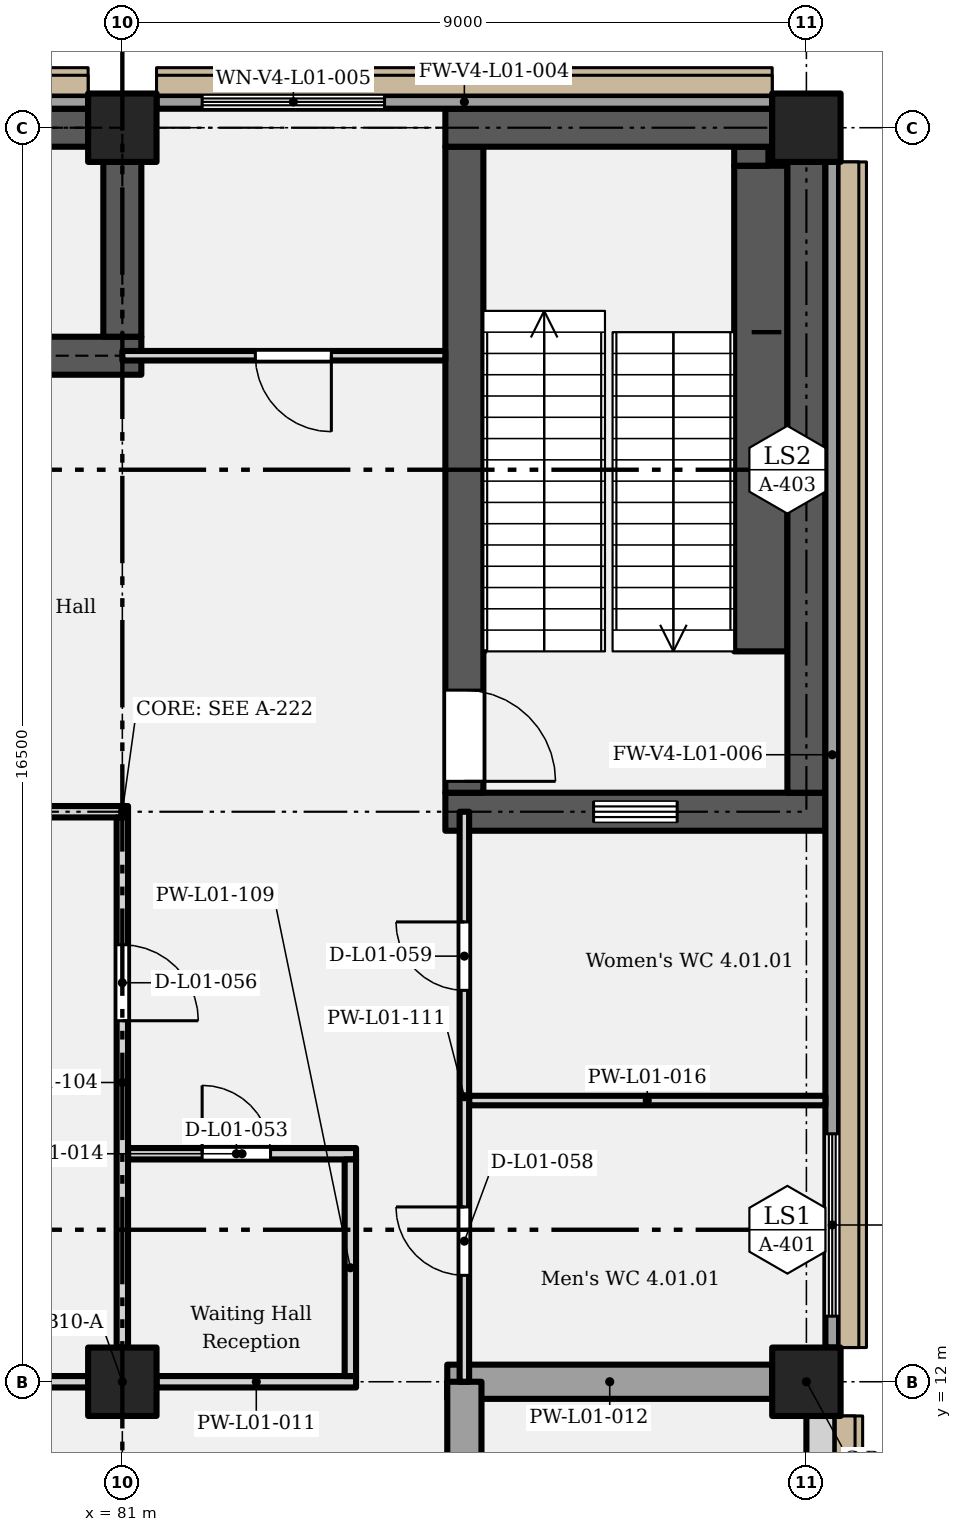
"""IFC4 building model, lengths in metres.
Left out: names, types, materials, properties, quantities, classifications, styles, units other than length and angle.
Written with IfcOpenShell. Run it as: python <this file> out.ifc"""

import sys

from ifc_helpers import new_model, si_unit, direction, frame, frame_2d, origin, origin_2d, place, context, subcontext, project, spatial, rectangle, extrude, element, fill, save


model = new_model("IFC4")
c1 = context("Model", 3, precision=1e-05, world=origin(), true_north=direction((0.0, 1.0)))
c2 = subcontext(c1, "Body", "Model", "MODEL_VIEW")
j1 = project(units=[si_unit("LENGTHUNIT", "METRE"), si_unit("PLANEANGLEUNIT", "RADIAN")], contexts=[c1])
p1 = place(None, origin())
s1 = spatial("IfcSite", under=j1, at=p1, CompositionType="ELEMENT")
p2 = place(p1, origin())
s2 = spatial("IfcBuilding", under=s1, at=p2, CompositionType="ELEMENT")
p3 = place(p2, frame((0.0, 0.0, 6.6)))
s3 = spatial("IfcBuildingStorey", under=s2, at=p3, CompositionType="ELEMENT", Elevation=6.6)
for number, where, z_axis, x_axis in (
    (1, (81.0, 12.0, 0.0), (0.0, 0.0, 1.0), (1.0, 0.0, 0.0)),
    (2, (90.0, 12.0, 0.0), (0.0, 0.0, 1.0), (1.0, 0.0, 0.0)),
    (3, (81.0, 28.5, 0.0), (0.0, 0.0, 1.0), (1.0, 0.0, 0.0)),
    (4, (90.0, 28.5, 0.0), (0.0, 0.0, 1.0), (1.0, 0.0, 0.0)),
):
    element("IfcColumn", number, at=place(p3, frame(where, z_axis=z_axis, x_axis=x_axis)), inside=s3, PredefinedType="COLUMN", context=c2, shape_type="SweptSolid", body=[
        extrude(rectangle(XDim=0.9, YDim=0.9, at=origin_2d()), origin(), (0.0, 0.0, 1.0), 5.202),
    ])
p4 = place(p3, frame((85.25, 19.5, 0.0), z_axis=(0.0, 0.0, 1.0), x_axis=(1.0, 0.0, 0.0)))
e5 = element("IfcWall", 5, at=p4, inside=s3, PredefinedType="SHEAR", context=c2, shape_type="SweptSolid", body=[
    extrude(rectangle(XDim=5.0, YDim=0.5, at=frame_2d((2.5, 0.0))), origin(), (0.0, 0.0, 1.0), 4.952),
])
p5 = place(p3, frame((85.5, 19.75, 0.0), z_axis=(0.0, 0.0, 1.0), x_axis=(0.0, 1.0, 0.0)))
e6 = element("IfcWall", 6, at=p5, inside=s3, PredefinedType="SHEAR", context=c2, shape_type="SweptSolid", body=[
    extrude(rectangle(XDim=8.5, YDim=0.5, at=frame_2d((4.25, 0.0))), origin(), (0.0, 0.0, 1.0), 4.952),
])
p6 = place(p5, frame((1.35, 0.0, 0.0), z_axis=(0.0, 0.0, 1.0), x_axis=(-1.0, 0.0, 0.0)))
e7 = element("IfcOpeningElement", 7, at=p6, cuts=e6, PredefinedType="OPENING", context=c2, shape_type="SweptSolid", body=[
    extrude(rectangle(XDim=1.2, YDim=2.1, at=frame_2d((0.6, 1.05))), frame((0.0, 0.26, 0.0), z_axis=(0.0, -1.0, 0.0), x_axis=(1.0, 0.0, 0.0)), (0.0, 0.0, 1.0), 0.52),
])
p7 = place(p3, frame((90.0, 19.75, 0.0), z_axis=(0.0, 0.0, 1.0), x_axis=(0.0, 1.0, 0.0)))
e8 = element("IfcWall", 8, at=p7, inside=s3, PredefinedType="SHEAR", context=c2, shape_type="SweptSolid", body=[
    extrude(rectangle(XDim=8.3, YDim=0.5, at=frame_2d((4.15, 0.0))), origin(), (0.0, 0.0, 1.0), 4.952),
])
p8 = place(p3, frame((76.75, 25.5, 0.0), z_axis=(0.0, 0.0, 1.0), x_axis=(1.0, 0.0, 0.0)))
e9 = element("IfcWall", 9, at=p8, inside=s3, PredefinedType="SHEAR", context=c2, shape_type="SweptSolid", body=[
    extrude(rectangle(XDim=4.5, YDim=0.5, at=frame_2d((2.25, 0.0))), origin(), (0.0, 0.0, 1.0), 4.952),
])
p9 = place(p8, frame((1.45, 0.0, 0.0)))
e10 = element("IfcOpeningElement", 10, at=p9, cuts=e9, PredefinedType="OPENING", context=c2, shape_type="SweptSolid", body=[
    extrude(rectangle(XDim=1.1, YDim=2.1, at=frame_2d((0.55, 1.05))), frame((0.0, 0.26, 0.0), z_axis=(0.0, -1.0, 0.0), x_axis=(1.0, 0.0, 0.0)), (0.0, 0.0, 1.0), 0.52),
])
p10 = place(p3, frame((81.0, 25.75, 0.0), z_axis=(0.0, 0.0, 1.0), x_axis=(0.0, 1.0, 0.0)))
e11 = element("IfcWall", 11, at=p10, inside=s3, PredefinedType="SHEAR", context=c2, shape_type="SweptSolid", body=[
    extrude(rectangle(XDim=2.3, YDim=0.5, at=frame_2d((1.15, 0.0))), origin(), (0.0, 0.0, 1.0), 4.952),
])
p11 = place(p3, frame((72.45, 28.5, 0.0), z_axis=(0.0, 0.0, 1.0), x_axis=(1.0, 0.0, 0.0)))
e12 = element("IfcWall", 12, at=p11, inside=s3, PredefinedType="SHEAR", context=c2, shape_type="SweptSolid", body=[
    extrude(rectangle(XDim=8.1, YDim=0.5, at=frame_2d((4.05, 0.0))), origin(), (0.0, 0.0, 1.0), 4.952),
])
p12 = place(p3, frame((85.25, 28.5, 0.0), z_axis=(0.0, 0.0, 1.0), x_axis=(1.0, 0.0, 0.0)))
e13 = element("IfcWall", 13, at=p12, inside=s3, PredefinedType="SHEAR", context=c2, shape_type="SweptSolid", body=[
    extrude(rectangle(XDim=4.3, YDim=0.5, at=frame_2d((2.15, 0.0))), origin(), (0.0, 0.0, 1.0), 4.952),
])
p13 = place(p3, frame((72.45, 28.84, 0.0), z_axis=(0.0, 0.0, 1.0), x_axis=(1.0, 0.0, 0.0)))
e14 = element("IfcWall", 14, at=p13, inside=s3, PredefinedType="SOLIDWALL", context=c2, shape_type="SweptSolid", body=[
    extrude(rectangle(XDim=8.1, YDim=0.18, at=frame_2d((4.05, 0.0))), origin(), (0.0, 0.0, 1.0), 4.952),
])
p14 = place(p3, frame((81.45, 28.84, 0.0), z_axis=(0.0, 0.0, 1.0), x_axis=(1.0, 0.0, 0.0)))
e15 = element("IfcWall", 15, at=p14, inside=s3, PredefinedType="SOLIDWALL", context=c2, shape_type="SweptSolid", body=[
    extrude(rectangle(XDim=8.1, YDim=0.18, at=frame_2d((4.05, 0.0))), origin(), (0.0, 0.0, 1.0), 4.952),
])
p15 = place(p14, frame((0.6, 0.0, 0.9)))
e16 = element("IfcOpeningElement", 16, at=p15, cuts=e15, PredefinedType="OPENING", context=c2, shape_type="SweptSolid", body=[
    extrude(rectangle(XDim=2.4, YDim=2.85, at=frame_2d((1.2, 1.425))), frame((0.0, 0.1, 0.0), z_axis=(0.0, -1.0, 0.0), x_axis=(1.0, 0.0, 0.0)), (0.0, 0.0, 1.0), 0.2),
])
p16 = place(p3, frame((90.19, 0.45, 0.0), z_axis=(0.0, 0.0, 1.0), x_axis=(0.0, 1.0, 0.0)))
e17 = element("IfcWall", 17, at=p16, inside=s3, PredefinedType="SOLIDWALL", context=c2, shape_type="SweptSolid", body=[
    extrude(rectangle(XDim=11.1, YDim=0.38, at=frame_2d((5.55, 0.0))), origin(), (0.0, 0.0, 1.0), 4.952),
])
p17 = place(p16, frame((0.725, 0.0, 1.05)))
e18 = element("IfcOpeningElement", 18, at=p17, cuts=e17, PredefinedType="OPENING", context=c2, shape_type="SweptSolid", body=[
    extrude(rectangle(XDim=1.65, YDim=2.1, at=frame_2d((0.825, 1.05))), frame((0.0, 0.2, 0.0), z_axis=(0.0, -1.0, 0.0), x_axis=(1.0, 0.0, 0.0)), (0.0, 0.0, 1.0), 0.4),
])
p18 = place(p16, frame((4.725, 0.0, 1.05)))
e19 = element("IfcOpeningElement", 19, at=p18, cuts=e17, PredefinedType="OPENING", context=c2, shape_type="SweptSolid", body=[
    extrude(rectangle(XDim=1.65, YDim=2.1, at=frame_2d((0.825, 1.05))), frame((0.0, 0.2, 0.0), z_axis=(0.0, -1.0, 0.0), x_axis=(1.0, 0.0, 0.0)), (0.0, 0.0, 1.0), 0.4),
])
p19 = place(p3, frame((90.34, 12.45, 0.0), z_axis=(0.0, 0.0, 1.0), x_axis=(0.0, 1.0, 0.0)))
e20 = element("IfcWall", 20, at=p19, inside=s3, PredefinedType="SOLIDWALL", context=c2, shape_type="SweptSolid", body=[
    extrude(rectangle(XDim=15.6, YDim=0.18, at=frame_2d((7.8, 0.0))), origin(), (0.0, 0.0, 1.0), 4.952),
])
p20 = place(p19, frame((0.413, 0.0, 0.9)))
e21 = element("IfcOpeningElement", 21, at=p20, cuts=e20, PredefinedType="OPENING", context=c2, shape_type="SweptSolid", body=[
    extrude(rectangle(XDim=2.4, YDim=2.85, at=frame_2d((1.2, 1.425))), frame((0.0, 0.1, 0.0), z_axis=(0.0, -1.0, 0.0), x_axis=(1.0, 0.0, 0.0)), (0.0, 0.0, 1.0), 0.2),
])
p21 = place(p3, frame((76.36, 25.5, 5.202), z_axis=(0.0, 0.0, 1.0), x_axis=(1.0, 0.0, 0.0)))
e22 = element("IfcWall", 22, at=p21, inside=s3, PredefinedType="SOLIDWALL", context=c2, shape_type="SweptSolid", body=[
    extrude(rectangle(XDim=4.78, YDim=0.28, at=frame_2d((2.39, 0.0))), origin(), (0.0, 0.0, 1.0), 3.1),
])
p22 = place(p21, frame((1.84, 0.0, 0.198)))
e23 = element("IfcOpeningElement", 23, at=p22, cuts=e22, PredefinedType="OPENING", context=c2, shape_type="SweptSolid", body=[
    extrude(rectangle(XDim=1.1, YDim=2.1, at=frame_2d((0.55, 1.05))), frame((0.0, 0.15, 0.0), z_axis=(0.0, -1.0, 0.0), x_axis=(1.0, 0.0, 0.0)), (0.0, 0.0, 1.0), 0.3),
])
p23 = place(p3, frame((76.36, 28.5, 5.202), z_axis=(0.0, 0.0, 1.0), x_axis=(1.0, 0.0, 0.0)))
e24 = element("IfcWall", 24, at=p23, inside=s3, PredefinedType="SOLIDWALL", context=c2, shape_type="SweptSolid", body=[
    extrude(rectangle(XDim=4.78, YDim=0.28, at=frame_2d((2.39, 0.0))), origin(), (0.0, 0.0, 1.0), 3.1),
])
p24 = place(p23, frame((1.84, 0.0, 2.4)))
e25 = element("IfcOpeningElement", 25, at=p24, cuts=e24, PredefinedType="OPENING", context=c2, shape_type="SweptSolid", body=[
    extrude(rectangle(XDim=1.1, YDim=0.6, at=frame_2d((0.55, 0.3))), frame((0.0, 0.15, 0.0), z_axis=(0.0, -1.0, 0.0), x_axis=(1.0, 0.0, 0.0)), (0.0, 0.0, 1.0), 0.3),
])
p25 = place(p3, frame((81.0, 25.64, 5.202), z_axis=(0.0, 0.0, 1.0), x_axis=(0.0, 1.0, 0.0)))
e26 = element("IfcWall", 26, at=p25, inside=s3, PredefinedType="SOLIDWALL", context=c2, shape_type="SweptSolid", body=[
    extrude(rectangle(XDim=2.72, YDim=0.28, at=frame_2d((1.36, 0.0))), origin(), (0.0, 0.0, 1.0), 3.1),
])
p26 = place(p3, frame((85.36, 19.5, 5.202), z_axis=(0.0, 0.0, 1.0), x_axis=(1.0, 0.0, 0.0)))
e27 = element("IfcWall", 27, at=p26, inside=s3, PredefinedType="SOLIDWALL", context=c2, shape_type="SweptSolid", body=[
    extrude(rectangle(XDim=4.78, YDim=0.28, at=frame_2d((2.39, 0.0))), origin(), (0.0, 0.0, 1.0), 3.1),
])
p27 = place(p26, frame((1.84, 0.0, 2.4)))
e28 = element("IfcOpeningElement", 28, at=p27, cuts=e27, PredefinedType="OPENING", context=c2, shape_type="SweptSolid", body=[
    extrude(rectangle(XDim=1.1, YDim=0.6, at=frame_2d((0.55, 0.3))), frame((0.0, 0.15, 0.0), z_axis=(0.0, -1.0, 0.0), x_axis=(1.0, 0.0, 0.0)), (0.0, 0.0, 1.0), 0.3),
])
p28 = place(p3, frame((85.36, 28.5, 5.202), z_axis=(0.0, 0.0, 1.0), x_axis=(1.0, 0.0, 0.0)))
e29 = element("IfcWall", 29, at=p28, inside=s3, PredefinedType="SOLIDWALL", context=c2, shape_type="SweptSolid", body=[
    extrude(rectangle(XDim=4.78, YDim=0.28, at=frame_2d((2.39, 0.0))), origin(), (0.0, 0.0, 1.0), 3.1),
])
p29 = place(p3, frame((85.5, 19.64, 5.202), z_axis=(0.0, 0.0, 1.0), x_axis=(0.0, 1.0, 0.0)))
e30 = element("IfcWall", 30, at=p29, inside=s3, PredefinedType="SOLIDWALL", context=c2, shape_type="SweptSolid", body=[
    extrude(rectangle(XDim=8.72, YDim=0.28, at=frame_2d((4.36, 0.0))), origin(), (0.0, 0.0, 1.0), 3.1),
])
p30 = place(p29, frame((1.46, 0.0, 0.198), z_axis=(0.0, 0.0, 1.0), x_axis=(-1.0, 0.0, 0.0)))
e31 = element("IfcOpeningElement", 31, at=p30, cuts=e30, PredefinedType="OPENING", context=c2, shape_type="SweptSolid", body=[
    extrude(rectangle(XDim=1.2, YDim=2.1, at=frame_2d((0.6, 1.05))), frame((0.0, 0.15, 0.0), z_axis=(0.0, -1.0, 0.0), x_axis=(1.0, 0.0, 0.0)), (0.0, 0.0, 1.0), 0.3),
])
p31 = place(p3, frame((90.0, 19.64, 5.202), z_axis=(0.0, 0.0, 1.0), x_axis=(0.0, 1.0, 0.0)))
e32 = element("IfcWall", 32, at=p31, inside=s3, PredefinedType="SOLIDWALL", context=c2, shape_type="SweptSolid", body=[
    extrude(rectangle(XDim=8.72, YDim=0.28, at=frame_2d((4.36, 0.0))), origin(), (0.0, 0.0, 1.0), 3.1),
])
for number, where, z_axis, x_axis in (
    (33, (77.925, 12.0, 0.0), (0.0, 0.0, 1.0), (1.0, 0.0, 0.0)),
    (34, (81.45, 12.0, 0.0), (0.0, 0.0, 1.0), (1.0, 0.0, 0.0)),
):
    element("IfcWall", number, at=place(p3, frame(where, z_axis=z_axis, x_axis=x_axis)), inside=s3, PredefinedType="PARTITIONING", context=c2, shape_type="SweptSolid", body=[
        extrude(rectangle(XDim=2.625, YDim=0.15, at=frame_2d((1.312, 0.0))), origin(), (0.0, 0.0, 1.0), 4.202),
    ])
p32 = place(p3, frame((85.275, 12.0, 0.0), z_axis=(0.0, 0.0, 1.0), x_axis=(1.0, 0.0, 0.0)))
e35 = element("IfcWall", 35, at=p32, inside=s3, PredefinedType="PARTITIONING", context=c2, shape_type="SweptSolid", body=[
    extrude(rectangle(XDim=4.275, YDim=0.45, at=frame_2d((2.138, 0.0))), origin(), (0.0, 0.0, 1.0), 4.202),
])
p33 = place(p3, frame((81.075, 15.0, 0.0), z_axis=(0.0, 0.0, 1.0), x_axis=(1.0, 0.0, 0.0)))
e36 = element("IfcWall", 36, at=p33, inside=s3, PredefinedType="PARTITIONING", context=c2, shape_type="SweptSolid", body=[
    extrude(rectangle(XDim=3.0, YDim=0.15, at=frame_2d((1.5, 0.0))), origin(), (0.0, 0.0, 1.0), 4.952),
])
p34 = place(p33, frame((0.975, 0.0, 0.0)))
e37 = element("IfcOpeningElement", 37, at=p34, cuts=e36, PredefinedType="OPENING", context=c2, shape_type="SweptSolid", body=[
    extrude(rectangle(XDim=0.9, YDim=2.1, at=frame_2d((0.45, 1.05))), frame((0.0, 0.085, 0.0), z_axis=(0.0, -1.0, 0.0), x_axis=(1.0, 0.0, 0.0)), (0.0, 0.0, 1.0), 0.17),
])
p35 = place(p3, frame((85.562, 15.7, 0.0), z_axis=(0.0, 0.0, 1.0), x_axis=(1.0, 0.0, 0.0)))
e38 = element("IfcWall", 38, at=p35, inside=s3, PredefinedType="PARTITIONING", context=c2, shape_type="SweptSolid", body=[
    extrude(rectangle(XDim=4.688, YDim=0.125, at=frame_2d((2.344, 0.0))), origin(), (0.0, 0.0, 1.0), 4.952),
])
p36 = place(p3, frame((76.5, 19.5, 0.0), z_axis=(0.0, 0.0, 1.0), x_axis=(1.0, 0.0, 0.0)))
e39 = element("IfcWall", 39, at=p36, inside=s3, PredefinedType="PARTITIONING", context=c2, shape_type="SweptSolid", body=[
    extrude(rectangle(XDim=4.575, YDim=0.15, at=frame_2d((2.288, 0.0))), origin(), (0.0, 0.0, 1.0), 4.952),
])
p37 = place(p3, frame((81.0, 25.5, 0.0), z_axis=(0.0, 0.0, 1.0), x_axis=(1.0, 0.0, 0.0)))
e40 = element("IfcWall", 40, at=p37, inside=s3, PredefinedType="PARTITIONING", context=c2, shape_type="SweptSolid", body=[
    extrude(rectangle(XDim=4.25, YDim=0.125, at=frame_2d((2.125, 0.0))), origin(), (0.0, 0.0, 1.0), 4.952),
])
p38 = place(p37, frame((2.75, 0.0, 0.0), z_axis=(0.0, 0.0, 1.0), x_axis=(-1.0, 0.0, 0.0)))
e41 = element("IfcOpeningElement", 41, at=p38, cuts=e40, PredefinedType="OPENING", context=c2, shape_type="SweptSolid", body=[
    extrude(rectangle(XDim=1.0, YDim=2.1, at=frame_2d((0.5, 1.05))), frame((0.0, 0.073, 0.0), z_axis=(0.0, -1.0, 0.0), x_axis=(1.0, 0.0, 0.0)), (0.0, 0.0, 1.0), 0.145),
])
p39 = place(p3, frame((81.0, 12.45, 0.0), z_axis=(0.0, 0.0, 1.0), x_axis=(0.0, 1.0, 0.0)))
e42 = element("IfcWall", 42, at=p39, inside=s3, PredefinedType="PARTITIONING", context=c2, shape_type="SweptSolid", body=[
    extrude(rectangle(XDim=6.975, YDim=0.15, at=frame_2d((3.488, 0.0))), origin(), (0.0, 0.0, 1.0), 4.002),
])
p40 = place(p39, frame((5.3, 0.0, 0.0), z_axis=(0.0, 0.0, 1.0), x_axis=(-1.0, 0.0, 0.0)))
e43 = element("IfcOpeningElement", 43, at=p40, cuts=e42, PredefinedType="OPENING", context=c2, shape_type="SweptSolid", body=[
    extrude(rectangle(XDim=1.0, YDim=2.1, at=frame_2d((0.5, 1.05))), frame((0.0, 0.085, 0.0), z_axis=(0.0, -1.0, 0.0), x_axis=(1.0, 0.0, 0.0)), (0.0, 0.0, 1.0), 0.17),
])
p41 = place(p3, frame((84.0, 12.075, 0.0), z_axis=(0.0, 0.0, 1.0), x_axis=(0.0, 1.0, 0.0)))
e44 = element("IfcWall", 44, at=p41, inside=s3, PredefinedType="PARTITIONING", context=c2, shape_type="SweptSolid", body=[
    extrude(rectangle(XDim=2.85, YDim=0.15, at=frame_2d((1.425, 0.0))), origin(), (0.0, 0.0, 1.0), 4.952),
])
p42 = place(p3, frame((85.5, 9.075, 0.0), z_axis=(0.0, 0.0, 1.0), x_axis=(0.0, 1.0, 0.0)))
e45 = element("IfcWall", 45, at=p42, inside=s3, PredefinedType="PARTITIONING", context=c2, shape_type="SweptSolid", body=[
    extrude(rectangle(XDim=2.925, YDim=0.45, at=frame_2d((1.462, 0.0))), origin(), (0.0, 0.0, 1.0), 4.952),
])
p43 = place(p42, frame((0.975, 0.0, 0.0)))
e46 = element("IfcOpeningElement", 46, at=p43, cuts=e45, PredefinedType="OPENING", context=c2, shape_type="SweptSolid", body=[
    extrude(rectangle(XDim=0.9, YDim=2.1, at=frame_2d((0.45, 1.05))), frame((0.0, 0.235, 0.0), z_axis=(0.0, -1.0, 0.0), x_axis=(1.0, 0.0, 0.0)), (0.0, 0.0, 1.0), 0.47),
])
p44 = place(p3, frame((85.5, 12.0, 0.0), z_axis=(0.0, 0.0, 1.0), x_axis=(0.0, 1.0, 0.0)))
e47 = element("IfcWall", 47, at=p44, inside=s3, PredefinedType="PARTITIONING", context=c2, shape_type="SweptSolid", body=[
    extrude(rectangle(XDim=7.5, YDim=0.125, at=frame_2d((3.75, 0.0))), origin(), (0.0, 0.0, 1.0), 4.952),
])
p45 = place(p44, frame((1.4, 0.0, 0.0)))
e48 = element("IfcOpeningElement", 48, at=p45, cuts=e47, PredefinedType="OPENING", context=c2, shape_type="SweptSolid", body=[
    extrude(rectangle(XDim=0.9, YDim=2.1, at=frame_2d((0.45, 1.05))), frame((0.0, 0.073, 0.0), z_axis=(0.0, -1.0, 0.0), x_axis=(1.0, 0.0, 0.0)), (0.0, 0.0, 1.0), 0.145),
])
p46 = place(p44, frame((5.15, 0.0, 0.0)))
e49 = element("IfcOpeningElement", 49, at=p46, cuts=e47, PredefinedType="OPENING", context=c2, shape_type="SweptSolid", body=[
    extrude(rectangle(XDim=0.9, YDim=2.1, at=frame_2d((0.45, 1.05))), frame((0.0, 0.073, 0.0), z_axis=(0.0, -1.0, 0.0), x_axis=(1.0, 0.0, 0.0)), (0.0, 0.0, 1.0), 0.145),
])
p47 = place(p3, frame((89.4, 21.61, 0.0), z_axis=(0.0, 0.0, 1.0), x_axis=(0.0, 1.0, 0.0)))
e50 = element("IfcWall", 50, at=p47, inside=s3, PredefinedType="SHEAR", context=c2, shape_type="SweptSolid", body=[
    extrude(rectangle(XDim=6.39, YDim=0.7, at=frame_2d((3.195, 0.0))), origin(), (0.0, 0.0, 1.0), 2.587),
])
p48 = place(p3, frame((89.275, 28.0, 0.0), z_axis=(0.0, 0.0, 1.0), x_axis=(0.0, 1.0, 0.0)))
e51 = element("IfcWall", 51, at=p48, inside=s3, PredefinedType="SHEAR", context=c2, shape_type="SweptSolid", body=[
    extrude(rectangle(XDim=0.25, YDim=0.45, at=frame_2d((0.125, 0.0))), origin(), (0.0, 0.0, 1.0), 2.587),
])
p49 = place(p15, origin())
e52 = element("IfcWindow", 52, at=p49, inside=s3, PartitioningType="SINGLE_PANEL", PredefinedType="WINDOW", context=c2, shape_type="SweptSolid", body=[
    extrude(rectangle(XDim=2.4, YDim=2.85, at=frame_2d((1.2, 1.425))), frame((0.0, 0.03, 0.0), z_axis=(0.0, -1.0, 0.0), x_axis=(1.0, 0.0, 0.0)), (0.0, 0.0, 1.0), 0.06),
])
fill(e16, e52)
p50 = place(p20, origin())
e53 = element("IfcWindow", 53, at=p50, inside=s3, PartitioningType="SINGLE_PANEL", PredefinedType="WINDOW", context=c2, shape_type="SweptSolid", body=[
    extrude(rectangle(XDim=2.4, YDim=2.85, at=frame_2d((1.2, 1.425))), frame((0.0, 0.03, 0.0), z_axis=(0.0, -1.0, 0.0), x_axis=(1.0, 0.0, 0.0)), (0.0, 0.0, 1.0), 0.06),
])
fill(e21, e53)
p51 = place(p27, origin())
e54 = element("IfcWindow", 54, at=p51, inside=s3, PartitioningType="SINGLE_PANEL", PredefinedType="WINDOW", context=c2, shape_type="SweptSolid", body=[
    extrude(rectangle(XDim=1.1, YDim=0.6, at=frame_2d((0.55, 0.3))), frame((0.0, 0.03, 0.0), z_axis=(0.0, -1.0, 0.0), x_axis=(1.0, 0.0, 0.0)), (0.0, 0.0, 1.0), 0.06),
])
fill(e28, e54)
p52 = place(p34, origin())
e55 = element("IfcDoor", 55, at=p52, inside=s3, OperationType="SINGLE_SWING_LEFT", PredefinedType="DOOR", context=c2, shape_type="SweptSolid", body=[
    extrude(rectangle(XDim=0.9, YDim=2.1, at=frame_2d((0.45, 1.05))), frame((0.0, 0.025, 0.0), z_axis=(0.0, -1.0, 0.0), x_axis=(1.0, 0.0, 0.0)), (0.0, 0.0, 1.0), 0.05),
])
fill(e37, e55)
p53 = place(p40, origin())
e56 = element("IfcDoor", 56, at=p53, inside=s3, OperationType="SINGLE_SWING_RIGHT", PredefinedType="DOOR", context=c2, shape_type="SweptSolid", body=[
    extrude(rectangle(XDim=1.0, YDim=2.1, at=frame_2d((0.5, 1.05))), frame((0.0, 0.025, 0.0), z_axis=(0.0, -1.0, 0.0), x_axis=(1.0, 0.0, 0.0)), (0.0, 0.0, 1.0), 0.05),
])
fill(e43, e56)
p54 = place(p45, origin())
e57 = element("IfcDoor", 57, at=p54, inside=s3, OperationType="SINGLE_SWING_RIGHT", PredefinedType="DOOR", context=c2, shape_type="SweptSolid", body=[
    extrude(rectangle(XDim=0.9, YDim=2.1, at=frame_2d((0.45, 1.05))), frame((0.0, 0.025, 0.0), z_axis=(0.0, -1.0, 0.0), x_axis=(1.0, 0.0, 0.0)), (0.0, 0.0, 1.0), 0.05),
])
fill(e48, e57)
p55 = place(p46, origin())
e58 = element("IfcDoor", 58, at=p55, inside=s3, OperationType="SINGLE_SWING_RIGHT", PredefinedType="DOOR", context=c2, shape_type="SweptSolid", body=[
    extrude(rectangle(XDim=0.9, YDim=2.1, at=frame_2d((0.45, 1.05))), frame((0.0, 0.025, 0.0), z_axis=(0.0, -1.0, 0.0), x_axis=(1.0, 0.0, 0.0)), (0.0, 0.0, 1.0), 0.05),
])
fill(e49, e58)
p56 = place(p38, origin())
e59 = element("IfcDoor", 59, at=p56, inside=s3, OperationType="SINGLE_SWING_LEFT", PredefinedType="DOOR", context=c2, shape_type="SweptSolid", body=[
    extrude(rectangle(XDim=1.0, YDim=2.1, at=frame_2d((0.5, 1.05))), frame((0.0, 0.025, 0.0), z_axis=(0.0, -1.0, 0.0), x_axis=(1.0, 0.0, 0.0)), (0.0, 0.0, 1.0), 0.05),
])
fill(e41, e59)
p57 = place(p6, origin())
e60 = element("IfcDoor", 60, at=p57, inside=s3, OperationType="SINGLE_SWING_RIGHT", PredefinedType="DOOR", context=c2, shape_type="SweptSolid", body=[
    extrude(rectangle(XDim=1.2, YDim=2.1, at=frame_2d((0.6, 1.05))), frame((0.0, 0.025, 0.0), z_axis=(0.0, -1.0, 0.0), x_axis=(1.0, 0.0, 0.0)), (0.0, 0.0, 1.0), 0.05),
])
fill(e7, e60)
save(model, sys.argv[1])
